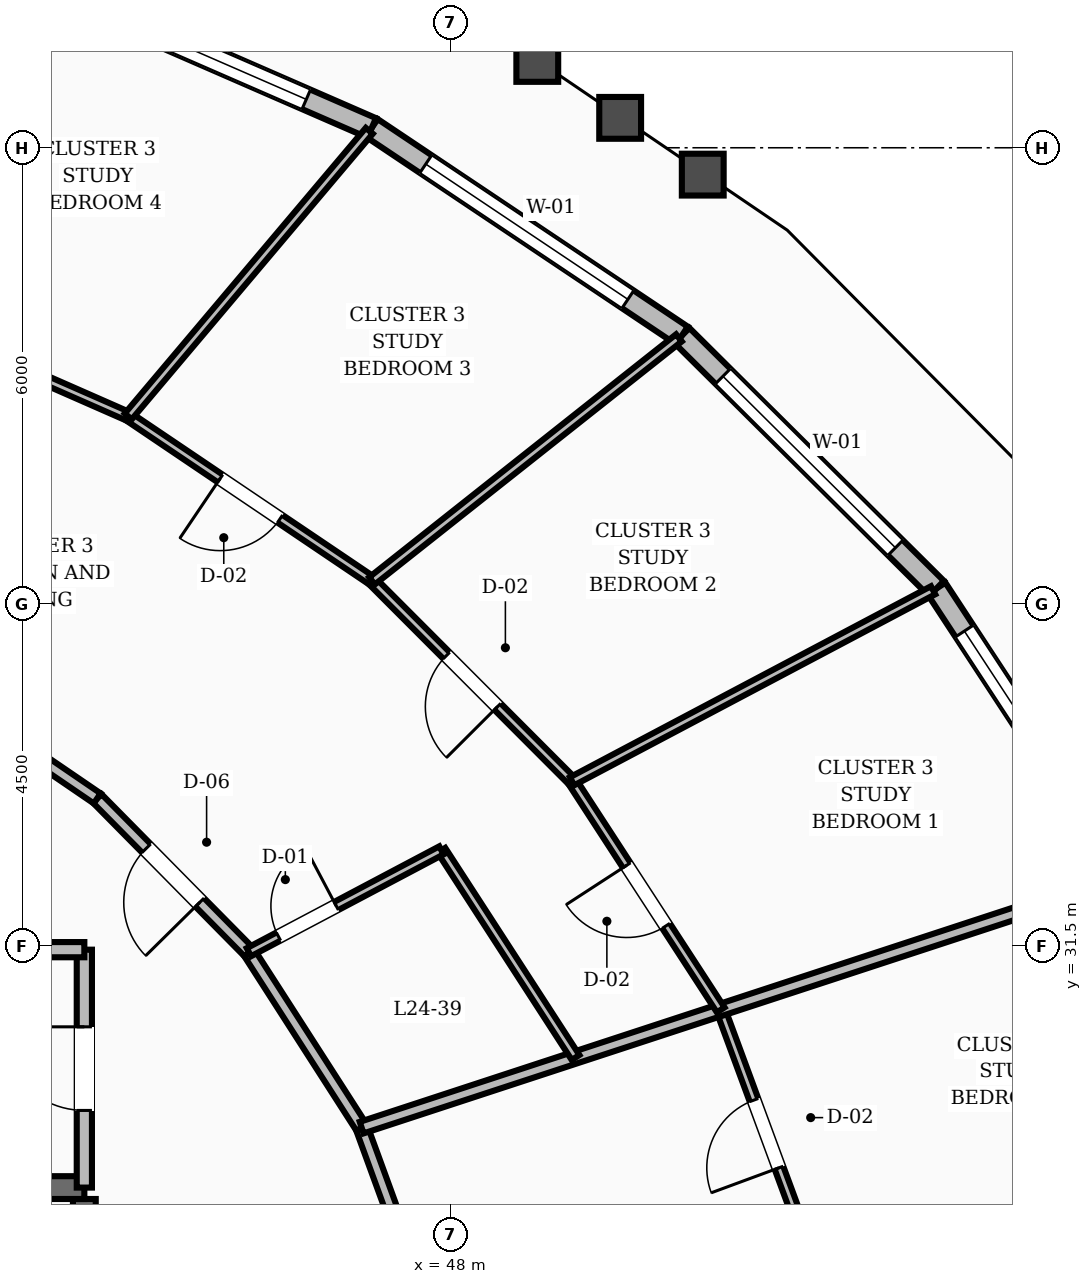
"""IFC4 building model, lengths in metres.
Left out: names, types, materials, properties, quantities, classifications, styles, units other than length and angle.
Written with IfcOpenShell. Run it as: python <this file> out.ifc"""

import sys

from ifc_helpers import new_model, si_unit, direction, frame, frame_2d, origin, place, context, subcontext, project, spatial, rectangle, extrude, element, fill, save


model = new_model("IFC4")
c1 = context("Model", 3, precision=1e-05, world=origin(), true_north=direction((0.0, 1.0)))
c2 = subcontext(c1, "Body", "Model", "MODEL_VIEW")
j1 = project(units=[si_unit("LENGTHUNIT", "METRE"), si_unit("PLANEANGLEUNIT", "RADIAN")], contexts=[c1])
p1 = place(None, origin())
s1 = spatial("IfcSite", under=j1, at=p1, CompositionType="ELEMENT")
p2 = place(p1, origin())
s2 = spatial("IfcBuilding", under=s1, at=p2, CompositionType="ELEMENT")
p3 = place(p2, frame((0.0, 0.0, 95.2)))
s3 = spatial("IfcBuildingStorey", under=s2, at=p3, CompositionType="ELEMENT", Elevation=95.2)
p4 = place(p3, frame((43.18, 19.43, 0.0), z_axis=(0.0, 0.0, 1.0), x_axis=(0.0, 1.0, 0.0)))
e1 = element("IfcWall", 1, at=p4, inside=s3, PredefinedType="SHEAR", context=c2, shape_type="SweptSolid", body=[
    extrude(rectangle(XDim=8.74, YDim=0.3, at=frame_2d((4.37, 0.0))), origin(), (0.0, 0.0, 1.0), 3.6),
])
p5 = place(p3, frame((39.58, 28.32, 0.0), z_axis=(0.0, 0.0, 1.0), x_axis=(1.0, 0.0, 0.0)))
e2 = element("IfcWall", 2, at=p5, inside=s3, PredefinedType="SHEAR", context=c2, shape_type="SweptSolid", body=[
    extrude(rectangle(XDim=3.6, YDim=0.3, at=frame_2d((1.8, 0.0))), origin(), (0.0, 0.0, 1.0), 3.6),
])
p6 = place(p5, frame((1.3, 0.0, 0.0)))
e3 = element("IfcOpeningElement", 3, at=p6, cuts=e2, PredefinedType="OPENING", context=c2, shape_type="SweptSolid", body=[
    extrude(rectangle(XDim=1.1, YDim=2.1, at=frame_2d((0.55, 1.05))), frame((0.0, 0.16, 0.0), z_axis=(0.0, -1.0, 0.0), x_axis=(1.0, 0.0, 0.0)), (0.0, 0.0, 1.0), 0.32),
])
p7 = place(p3, frame((56.879, 32.405, 0.0), z_axis=(0.0, 0.0, 1.0), x_axis=(-0.548143021063, 0.836384617541, 0.0)))
e4 = element("IfcWall", 4, at=p7, inside=s3, PredefinedType="STANDARD", context=c2, shape_type="SweptSolid", body=[
    extrude(rectangle(XDim=4.54, YDim=0.28, at=frame_2d((2.27, 0.0))), origin(), (0.0, 0.0, 1.0), 2.71),
])
p8 = place(p7, frame((0.67, 0.0, 0.8)))
e5 = element("IfcOpeningElement", 5, at=p8, cuts=e4, PredefinedType="OPENING", context=c2, shape_type="SweptSolid", body=[
    extrude(rectangle(XDim=3.2, YDim=1.65, at=frame_2d((1.6, 0.825))), frame((0.0, 0.15, 0.0), z_axis=(0.0, -1.0, 0.0), x_axis=(1.0, 0.0, 0.0)), (0.0, 0.0, 1.0), 0.3),
])
p9 = place(p3, frame((54.391, 36.202, 0.0), z_axis=(0.0, 0.0, 1.0), x_axis=(-0.70930102543, 0.70490570669, 0.0)))
e6 = element("IfcWall", 6, at=p9, inside=s3, PredefinedType="STANDARD", context=c2, shape_type="SweptSolid", body=[
    extrude(rectangle(XDim=4.721, YDim=0.28, at=frame_2d((2.361, 0.0))), origin(), (0.0, 0.0, 1.0), 2.71),
])
p10 = place(p9, frame((0.761, 0.0, 0.8)))
e7 = element("IfcOpeningElement", 7, at=p10, cuts=e6, PredefinedType="OPENING", context=c2, shape_type="SweptSolid", body=[
    extrude(rectangle(XDim=3.2, YDim=1.65, at=frame_2d((1.6, 0.825))), frame((0.0, 0.15, 0.0), z_axis=(0.0, -1.0, 0.0), x_axis=(1.0, 0.0, 0.0)), (0.0, 0.0, 1.0), 0.3),
])
p11 = place(p3, frame((51.042, 39.53, 0.0), z_axis=(0.0, 0.0, 1.0), x_axis=(-0.831046915145, 0.556202323645, 0.0)))
e8 = element("IfcWall", 8, at=p11, inside=s3, PredefinedType="STANDARD", context=c2, shape_type="SweptSolid", body=[
    extrude(rectangle(XDim=4.91, YDim=0.28, at=frame_2d((2.455, 0.0))), origin(), (0.0, 0.0, 1.0), 2.71),
])
p12 = place(p11, frame((0.855, 0.0, 0.8)))
e9 = element("IfcOpeningElement", 9, at=p12, cuts=e8, PredefinedType="OPENING", context=c2, shape_type="SweptSolid", body=[
    extrude(rectangle(XDim=3.2, YDim=1.65, at=frame_2d((1.6, 0.825))), frame((0.0, 0.15, 0.0), z_axis=(0.0, -1.0, 0.0), x_axis=(1.0, 0.0, 0.0)), (0.0, 0.0, 1.0), 0.3),
])
p13 = place(p3, frame((46.961, 42.261, 0.0), z_axis=(0.0, 0.0, 1.0), x_axis=(-0.916680612936, 0.39962063744, 0.0)))
e10 = element("IfcWall", 10, at=p13, inside=s3, PredefinedType="STANDARD", context=c2, shape_type="SweptSolid", body=[
    extrude(rectangle(XDim=5.079, YDim=0.28, at=frame_2d((2.539, 0.0))), origin(), (0.0, 0.0, 1.0), 2.71),
])
p14 = place(p13, frame((0.939, 0.0, 0.8)))
e11 = element("IfcOpeningElement", 11, at=p14, cuts=e10, PredefinedType="OPENING", context=c2, shape_type="SweptSolid", body=[
    extrude(rectangle(XDim=3.2, YDim=1.65, at=frame_2d((1.6, 0.825))), frame((0.0, 0.15, 0.0), z_axis=(0.0, -1.0, 0.0), x_axis=(1.0, 0.0, 0.0)), (0.0, 0.0, 1.0), 0.3),
])
p15 = place(p3, frame((43.18, 28.32, 0.0), z_axis=(0.0, 0.0, 1.0), x_axis=(0.0, 1.0, 0.0)))
e12 = element("IfcWall", 12, at=p15, inside=s3, PredefinedType="SOLIDWALL", context=c2, shape_type="SweptSolid", body=[
    extrude(rectangle(XDim=3.13, YDim=0.2, at=frame_2d((1.565, 0.0))), origin(), (0.0, 0.0, 1.0), 2.71),
])
p16 = place(p15, frame((1.015, 0.0, 0.0)))
e13 = element("IfcOpeningElement", 13, at=p16, cuts=e12, PredefinedType="OPENING", context=c2, shape_type="SweptSolid", body=[
    extrude(rectangle(XDim=1.1, YDim=2.1, at=frame_2d((0.55, 1.05))), frame((0.0, 0.11, 0.0), z_axis=(0.0, -1.0, 0.0), x_axis=(1.0, 0.0, 0.0)), (0.0, 0.0, 1.0), 0.22),
])
p17 = place(p3, frame((39.2, 31.45, 0.0), z_axis=(0.0, 0.0, 1.0), x_axis=(1.0, 0.0, 0.0)))
e14 = element("IfcWall", 14, at=p17, inside=s3, PredefinedType="SOLIDWALL", context=c2, shape_type="SweptSolid", body=[
    extrude(rectangle(XDim=3.98, YDim=0.2, at=frame_2d((1.99, 0.0))), origin(), (0.0, 0.0, 1.0), 2.71),
])
p18 = place(p3, frame((47.742, 26.604, 0.0), z_axis=(0.0, 0.0, 1.0), x_axis=(-0.342617982381, 0.939474809747, 0.0)))
e15 = element("IfcWall", 15, at=p18, inside=s3, PredefinedType="SOLIDWALL", context=c2, shape_type="SweptSolid", body=[
    extrude(rectangle(XDim=2.666, YDim=0.16, at=frame_2d((1.333, 0.0))), origin(), (0.0, 0.0, 1.0), 2.71),
])
p19 = place(p3, frame((46.828, 29.109, 0.0), z_axis=(0.0, 0.0, 1.0), x_axis=(-0.540595670038, 0.841282545603, 0.0)))
e16 = element("IfcWall", 16, at=p19, inside=s3, PredefinedType="SOLIDWALL", context=c2, shape_type="SweptSolid", body=[
    extrude(rectangle(XDim=2.744, YDim=0.16, at=frame_2d((1.372, 0.0))), origin(), (0.0, 0.0, 1.0), 2.71),
])
p20 = place(p3, frame((45.345, 31.417, 0.0), z_axis=(0.0, 0.0, 1.0), x_axis=(-0.702366174226, 0.711815816981, 0.0)))
e17 = element("IfcWall", 17, at=p20, inside=s3, PredefinedType="SOLIDWALL", context=c2, shape_type="SweptSolid", body=[
    extrude(rectangle(XDim=2.842, YDim=0.16, at=frame_2d((1.421, 0.0))), origin(), (0.0, 0.0, 1.0), 2.71),
])
p21 = place(p20, frame((0.921, 0.0, 0.0)))
e18 = element("IfcOpeningElement", 18, at=p21, cuts=e17, PredefinedType="OPENING", context=c2, shape_type="SweptSolid", body=[
    extrude(rectangle(XDim=1.0, YDim=2.1, at=frame_2d((0.5, 1.05))), frame((0.0, 0.09, 0.0), z_axis=(0.0, -1.0, 0.0), x_axis=(1.0, 0.0, 0.0)), (0.0, 0.0, 1.0), 0.18),
])
p22 = place(p3, frame((43.349, 33.44, 0.0), z_axis=(0.0, 0.0, 1.0), x_axis=(-0.825929039072, 0.563774088104, 0.0)))
e19 = element("IfcWall", 19, at=p22, inside=s3, PredefinedType="SOLIDWALL", context=c2, shape_type="SweptSolid", body=[
    extrude(rectangle(XDim=2.945, YDim=0.16, at=frame_2d((1.472, 0.0))), origin(), (0.0, 0.0, 1.0), 2.71),
])
p23 = place(p3, frame((52.757, 27.394, 0.0), z_axis=(0.0, 0.0, 1.0), x_axis=(-0.346219193067, 0.93815364965, 0.0)))
e20 = element("IfcWall", 20, at=p23, inside=s3, PredefinedType="PARTITIONING", context=c2, shape_type="SweptSolid", body=[
    extrude(rectangle(XDim=3.479, YDim=0.12, at=frame_2d((1.739, 0.0))), origin(), (0.0, 0.0, 1.0), 2.71),
])
p24 = place(p23, frame((1.264, 0.0, 0.0)))
e21 = element("IfcOpeningElement", 21, at=p24, cuts=e20, PredefinedType="OPENING", context=c2, shape_type="SweptSolid", body=[
    extrude(rectangle(XDim=0.95, YDim=2.1, at=frame_2d((0.475, 1.05))), frame((0.0, 0.07, 0.0), z_axis=(0.0, -1.0, 0.0), x_axis=(1.0, 0.0, 0.0)), (0.0, 0.0, 1.0), 0.14),
])
p25 = place(p3, frame((52.757, 27.394, 0.0), z_axis=(0.0, 0.0, 1.0), x_axis=(0.987831936488, 0.155525127407, 0.0)))
e22 = element("IfcWall", 22, at=p25, inside=s3, PredefinedType="PARTITIONING", context=c2, shape_type="SweptSolid", body=[
    extrude(rectangle(XDim=5.675, YDim=0.12, at=frame_2d((2.837, 0.0))), origin(), (0.0, 0.0, 1.0), 2.71),
])
p26 = place(p3, frame((46.828, 29.109, 0.0), z_axis=(0.0, 0.0, 1.0), x_axis=(0.950223350547, 0.311569549339, 0.0)))
e23 = element("IfcWall", 23, at=p26, inside=s3, PredefinedType="SOLIDWALL", context=c2, shape_type="SweptSolid", body=[
    extrude(rectangle(XDim=10.527, YDim=0.16, at=frame_2d((5.264, 0.0))), origin(), (0.0, 0.0, 1.0), 2.71),
])
p27 = place(p3, frame((49.643, 30.031, 0.0), z_axis=(0.0, 0.0, 1.0), x_axis=(-0.54354434096, 0.8393804557, 0.0)))
e24 = element("IfcWall", 24, at=p27, inside=s3, PredefinedType="PARTITIONING", context=c2, shape_type="SweptSolid", body=[
    extrude(rectangle(XDim=3.247, YDim=0.12, at=frame_2d((1.623, 0.0))), origin(), (0.0, 0.0, 1.0), 2.71),
])
p28 = place(p3, frame((45.345, 31.417, 0.0), z_axis=(0.0, 0.0, 1.0), x_axis=(0.883968173421, 0.46754707611, 0.0)))
e25 = element("IfcWall", 25, at=p28, inside=s3, PredefinedType="PARTITIONING", context=c2, shape_type="SweptSolid", body=[
    extrude(rectangle(XDim=2.865, YDim=0.12, at=frame_2d((1.433, 0.0))), origin(), (0.0, 0.0, 1.0), 2.71),
])
p29 = place(p28, frame((0.44, 0.0, 0.0)))
e26 = element("IfcOpeningElement", 26, at=p29, cuts=e25, PredefinedType="OPENING", context=c2, shape_type="SweptSolid", body=[
    extrude(rectangle(XDim=0.86, YDim=2.1, at=frame_2d((0.43, 1.05))), frame((0.0, 0.07, 0.0), z_axis=(0.0, -1.0, 0.0), x_axis=(1.0, 0.0, 0.0)), (0.0, 0.0, 1.0), 0.14),
])
p30 = place(p3, frame((51.552, 30.658, 0.0), z_axis=(0.0, 0.0, 1.0), x_axis=(-0.545100755876, 0.838370542149, 0.0)))
e27 = element("IfcWall", 27, at=p30, inside=s3, PredefinedType="PARTITIONING", context=c2, shape_type="SweptSolid", body=[
    extrude(rectangle(XDim=3.588, YDim=0.12, at=frame_2d((1.794, 0.0))), origin(), (0.0, 0.0, 1.0), 2.71),
])
p31 = place(p30, frame((1.319, 0.0, 0.0)))
e28 = element("IfcOpeningElement", 28, at=p31, cuts=e27, PredefinedType="OPENING", context=c2, shape_type="SweptSolid", body=[
    extrude(rectangle(XDim=0.95, YDim=2.1, at=frame_2d((0.475, 1.05))), frame((0.0, 0.07, 0.0), z_axis=(0.0, -1.0, 0.0), x_axis=(1.0, 0.0, 0.0)), (0.0, 0.0, 1.0), 0.14),
])
p32 = place(p3, frame((49.596, 33.666, 0.0), z_axis=(0.0, 0.0, 1.0), x_axis=(-0.706483909955, 0.70772910423, 0.0)))
e29 = element("IfcWall", 29, at=p32, inside=s3, PredefinedType="PARTITIONING", context=c2, shape_type="SweptSolid", body=[
    extrude(rectangle(XDim=3.725, YDim=0.12, at=frame_2d((1.863, 0.0))), origin(), (0.0, 0.0, 1.0), 2.71),
])
p33 = place(p32, frame((1.388, 0.0, 0.0)))
e30 = element("IfcOpeningElement", 30, at=p33, cuts=e29, PredefinedType="OPENING", context=c2, shape_type="SweptSolid", body=[
    extrude(rectangle(XDim=0.95, YDim=2.1, at=frame_2d((0.475, 1.05))), frame((0.0, 0.07, 0.0), z_axis=(0.0, -1.0, 0.0), x_axis=(1.0, 0.0, 0.0)), (0.0, 0.0, 1.0), 0.14),
])
p34 = place(p3, frame((49.596, 33.666, 0.0), z_axis=(0.0, 0.0, 1.0), x_axis=(0.883961363843, 0.467559950417, 0.0)))
e31 = element("IfcWall", 31, at=p34, inside=s3, PredefinedType="PARTITIONING", context=c2, shape_type="SweptSolid", body=[
    extrude(rectangle(XDim=5.374, YDim=0.12, at=frame_2d((2.687, 0.0))), origin(), (0.0, 0.0, 1.0), 2.71),
])
p35 = place(p3, frame((46.965, 36.302, 0.0), z_axis=(0.0, 0.0, 1.0), x_axis=(-0.828989117178, 0.559264734808, 0.0)))
e32 = element("IfcWall", 32, at=p35, inside=s3, PredefinedType="PARTITIONING", context=c2, shape_type="SweptSolid", body=[
    extrude(rectangle(XDim=3.869, YDim=0.12, at=frame_2d((1.934, 0.0))), origin(), (0.0, 0.0, 1.0), 2.71),
])
p36 = place(p35, frame((1.459, 0.0, 0.0)))
e33 = element("IfcOpeningElement", 33, at=p36, cuts=e32, PredefinedType="OPENING", context=c2, shape_type="SweptSolid", body=[
    extrude(rectangle(XDim=0.95, YDim=2.1, at=frame_2d((0.475, 1.05))), frame((0.0, 0.07, 0.0), z_axis=(0.0, -1.0, 0.0), x_axis=(1.0, 0.0, 0.0)), (0.0, 0.0, 1.0), 0.14),
])
p37 = place(p3, frame((46.965, 36.302, 0.0), z_axis=(0.0, 0.0, 1.0), x_axis=(0.784054475927, 0.620692016042, 0.0)))
e34 = element("IfcWall", 34, at=p37, inside=s3, PredefinedType="PARTITIONING", context=c2, shape_type="SweptSolid", body=[
    extrude(rectangle(XDim=5.15, YDim=0.12, at=frame_2d((2.575, 0.0))), origin(), (0.0, 0.0, 1.0), 2.71),
])
p38 = place(p3, frame((43.758, 38.466, 0.0), z_axis=(0.0, 0.0, 1.0), x_axis=(-0.91551399957, 0.40228611285, 0.0)))
e35 = element("IfcWall", 35, at=p38, inside=s3, PredefinedType="PARTITIONING", context=c2, shape_type="SweptSolid", body=[
    extrude(rectangle(XDim=3.996, YDim=0.12, at=frame_2d((1.998, 0.0))), origin(), (0.0, 0.0, 1.0), 2.71),
])
p39 = place(p38, frame((1.523, 0.0, 0.0)))
e36 = element("IfcOpeningElement", 36, at=p39, cuts=e35, PredefinedType="OPENING", context=c2, shape_type="SweptSolid", body=[
    extrude(rectangle(XDim=0.95, YDim=2.1, at=frame_2d((0.475, 1.05))), frame((0.0, 0.07, 0.0), z_axis=(0.0, -1.0, 0.0), x_axis=(1.0, 0.0, 0.0)), (0.0, 0.0, 1.0), 0.14),
])
p40 = place(p3, frame((43.758, 38.466, 0.0), z_axis=(0.0, 0.0, 1.0), x_axis=(0.64500236789, 0.764180571211, 0.0)))
e37 = element("IfcWall", 37, at=p40, inside=s3, PredefinedType="PARTITIONING", context=c2, shape_type="SweptSolid", body=[
    extrude(rectangle(XDim=4.917, YDim=0.12, at=frame_2d((2.458, 0.0))), origin(), (0.0, 0.0, 1.0), 2.71),
])
p41 = place(p8, origin())
e38 = element("IfcWindow", 38, at=p41, inside=s3, PartitioningType="SINGLE_PANEL", PredefinedType="WINDOW", context=c2, shape_type="SweptSolid", body=[
    extrude(rectangle(XDim=3.2, YDim=1.65, at=frame_2d((1.6, 0.825))), frame((0.0, 0.03, 0.0), z_axis=(0.0, -1.0, 0.0), x_axis=(1.0, 0.0, 0.0)), (0.0, 0.0, 1.0), 0.06),
])
fill(e5, e38)
p42 = place(p10, origin())
e39 = element("IfcWindow", 39, at=p42, inside=s3, PartitioningType="SINGLE_PANEL", PredefinedType="WINDOW", context=c2, shape_type="SweptSolid", body=[
    extrude(rectangle(XDim=3.2, YDim=1.65, at=frame_2d((1.6, 0.825))), frame((0.0, 0.03, 0.0), z_axis=(0.0, -1.0, 0.0), x_axis=(1.0, 0.0, 0.0)), (0.0, 0.0, 1.0), 0.06),
])
fill(e7, e39)
p43 = place(p12, origin())
e40 = element("IfcWindow", 40, at=p43, inside=s3, PartitioningType="SINGLE_PANEL", PredefinedType="WINDOW", context=c2, shape_type="SweptSolid", body=[
    extrude(rectangle(XDim=3.2, YDim=1.65, at=frame_2d((1.6, 0.825))), frame((0.0, 0.03, 0.0), z_axis=(0.0, -1.0, 0.0), x_axis=(1.0, 0.0, 0.0)), (0.0, 0.0, 1.0), 0.06),
])
fill(e9, e40)
p44 = place(p14, origin())
e41 = element("IfcWindow", 41, at=p44, inside=s3, PartitioningType="SINGLE_PANEL", PredefinedType="WINDOW", context=c2, shape_type="SweptSolid", body=[
    extrude(rectangle(XDim=3.2, YDim=1.65, at=frame_2d((1.6, 0.825))), frame((0.0, 0.03, 0.0), z_axis=(0.0, -1.0, 0.0), x_axis=(1.0, 0.0, 0.0)), (0.0, 0.0, 1.0), 0.06),
])
fill(e11, e41)
p45 = place(p16, origin())
e42 = element("IfcDoor", 42, at=p45, inside=s3, OperationType="SINGLE_SWING_RIGHT", PredefinedType="DOOR", context=c2, shape_type="SweptSolid", body=[
    extrude(rectangle(XDim=1.1, YDim=2.1, at=frame_2d((0.55, 1.05))), frame((0.0, 0.025, 0.0), z_axis=(0.0, -1.0, 0.0), x_axis=(1.0, 0.0, 0.0)), (0.0, 0.0, 1.0), 0.05),
])
fill(e13, e42)
p46 = place(p24, origin())
e43 = element("IfcDoor", 43, at=p46, inside=s3, OperationType="SINGLE_SWING_LEFT", PredefinedType="DOOR", context=c2, shape_type="SweptSolid", body=[
    extrude(rectangle(XDim=0.95, YDim=2.1, at=frame_2d((0.475, 1.05))), frame((0.0, 0.025, 0.0), z_axis=(0.0, -1.0, 0.0), x_axis=(1.0, 0.0, 0.0)), (0.0, 0.0, 1.0), 0.05),
])
fill(e21, e43)
p47 = place(p29, origin())
e44 = element("IfcDoor", 44, at=p47, inside=s3, OperationType="SINGLE_SWING_RIGHT", PredefinedType="DOOR", context=c2, shape_type="SweptSolid", body=[
    extrude(rectangle(XDim=0.86, YDim=2.1, at=frame_2d((0.43, 1.05))), frame((0.0, 0.025, 0.0), z_axis=(0.0, -1.0, 0.0), x_axis=(1.0, 0.0, 0.0)), (0.0, 0.0, 1.0), 0.05),
])
fill(e26, e44)
p48 = place(p21, origin())
e45 = element("IfcDoor", 45, at=p48, inside=s3, OperationType="SINGLE_SWING_LEFT", PredefinedType="DOOR", context=c2, shape_type="SweptSolid", body=[
    extrude(rectangle(XDim=1.0, YDim=2.1, at=frame_2d((0.5, 1.05))), frame((0.0, 0.025, 0.0), z_axis=(0.0, -1.0, 0.0), x_axis=(1.0, 0.0, 0.0)), (0.0, 0.0, 1.0), 0.05),
])
fill(e18, e45)
p49 = place(p31, origin())
e46 = element("IfcDoor", 46, at=p49, inside=s3, OperationType="SINGLE_SWING_RIGHT", PredefinedType="DOOR", context=c2, shape_type="SweptSolid", body=[
    extrude(rectangle(XDim=0.95, YDim=2.1, at=frame_2d((0.475, 1.05))), frame((0.0, 0.025, 0.0), z_axis=(0.0, -1.0, 0.0), x_axis=(1.0, 0.0, 0.0)), (0.0, 0.0, 1.0), 0.05),
])
fill(e28, e46)
p50 = place(p33, origin())
e47 = element("IfcDoor", 47, at=p50, inside=s3, OperationType="SINGLE_SWING_LEFT", PredefinedType="DOOR", context=c2, shape_type="SweptSolid", body=[
    extrude(rectangle(XDim=0.95, YDim=2.1, at=frame_2d((0.475, 1.05))), frame((0.0, 0.025, 0.0), z_axis=(0.0, -1.0, 0.0), x_axis=(1.0, 0.0, 0.0)), (0.0, 0.0, 1.0), 0.05),
])
fill(e30, e47)
p51 = place(p36, origin())
e48 = element("IfcDoor", 48, at=p51, inside=s3, OperationType="SINGLE_SWING_RIGHT", PredefinedType="DOOR", context=c2, shape_type="SweptSolid", body=[
    extrude(rectangle(XDim=0.95, YDim=2.1, at=frame_2d((0.475, 1.05))), frame((0.0, 0.025, 0.0), z_axis=(0.0, -1.0, 0.0), x_axis=(1.0, 0.0, 0.0)), (0.0, 0.0, 1.0), 0.05),
])
fill(e33, e48)
save(model, sys.argv[1])
